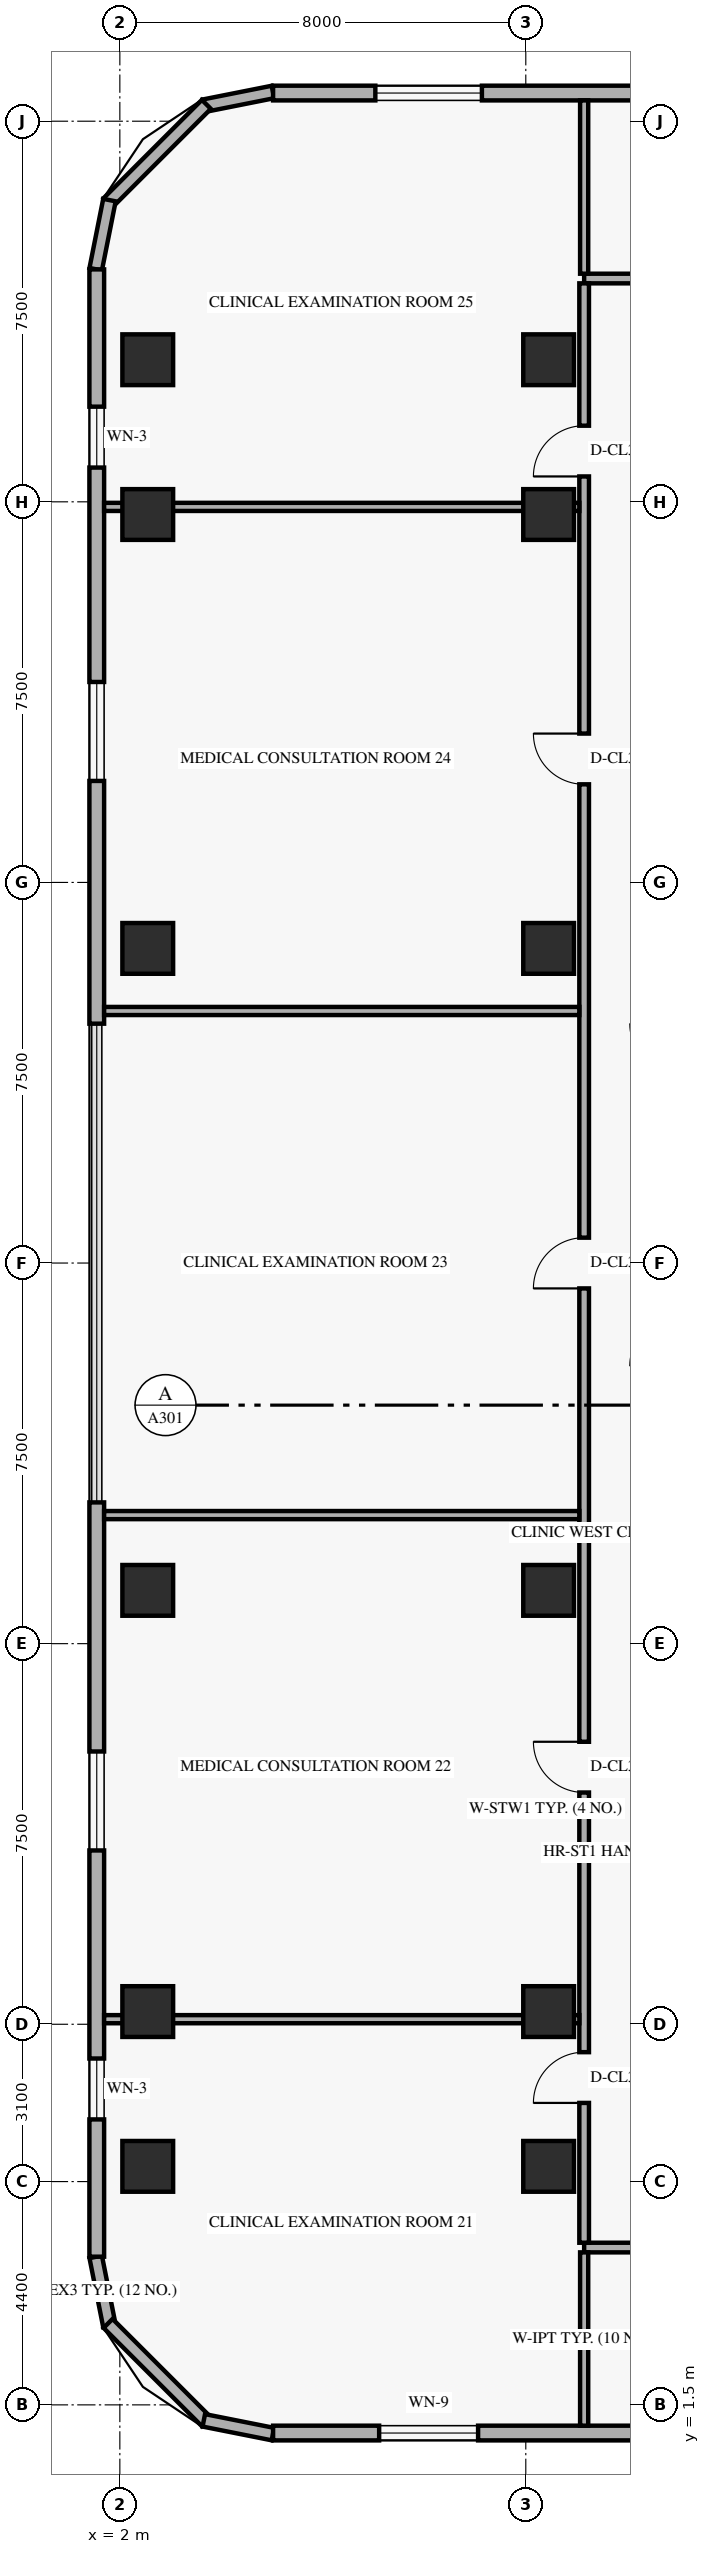
"""IFC4 building model, lengths in metres.
Left out: names, types, materials, properties, quantities, classifications, styles, units other than length and angle.
Written with IfcOpenShell. Run it as: python <this file> out.ifc"""

import sys

from ifc_helpers import new_model, si_unit, direction, frame, frame_2d, origin, origin_2d, place, context, subcontext, project, spatial, rectangle, extrude, element, fill, save


model = new_model("IFC4")
c1 = context("Model", 3, precision=1e-05, world=origin(), true_north=direction((0.0, 1.0)))
c2 = subcontext(c1, "Body", "Model", "MODEL_VIEW")
j1 = project(units=[si_unit("LENGTHUNIT", "METRE"), si_unit("PLANEANGLEUNIT", "RADIAN")], contexts=[c1])
p1 = place(None, origin())
s1 = spatial("IfcSite", under=j1, at=p1, CompositionType="ELEMENT")
p2 = place(p1, origin())
s2 = spatial("IfcBuilding", under=s1, at=p2, CompositionType="ELEMENT")
p3 = place(p2, frame((0.0, 0.0, 9.6)))
s3 = spatial("IfcBuildingStorey", under=s2, at=p3, CompositionType="ELEMENT", Elevation=9.6)
for number, where, z_axis, x_axis in (
    (1, (2.55, 6.2, 0.0), (0.0, 0.0, 1.0), (1.0, 0.0, 0.0)),
    (2, (2.55, 9.25, 0.0), (0.0, 0.0, 1.0), (1.0, 0.0, 0.0)),
    (3, (2.55, 17.55, 0.0), (0.0, 0.0, 1.0), (1.0, 0.0, 0.0)),
    (4, (2.55, 30.2, 0.0), (0.0, 0.0, 1.0), (1.0, 0.0, 0.0)),
    (5, (2.55, 38.75, 0.0), (0.0, 0.0, 1.0), (1.0, 0.0, 0.0)),
    (6, (2.55, 41.8, 0.0), (0.0, 0.0, 1.0), (1.0, 0.0, 0.0)),
    (7, (10.45, 6.2, 0.0), (0.0, 0.0, 1.0), (1.0, 0.0, 0.0)),
    (8, (10.45, 9.25, 0.0), (0.0, 0.0, 1.0), (1.0, 0.0, 0.0)),
    (9, (10.45, 17.55, 0.0), (0.0, 0.0, 1.0), (1.0, 0.0, 0.0)),
    (10, (10.45, 30.2, 0.0), (0.0, 0.0, 1.0), (1.0, 0.0, 0.0)),
    (11, (10.45, 38.75, 0.0), (0.0, 0.0, 1.0), (1.0, 0.0, 0.0)),
    (12, (10.45, 41.8, 0.0), (0.0, 0.0, 1.0), (1.0, 0.0, 0.0)),
):
    element("IfcColumn", number, at=place(p3, frame(where, z_axis=z_axis, x_axis=x_axis)), inside=s3, PredefinedType="COLUMN", context=c2, shape_type="SweptSolid", body=[
        extrude(rectangle(XDim=1.0, YDim=1.0, at=origin_2d()), origin(), (0.0, 0.0, 1.0), 4.8),
    ])
p4 = place(p3, frame((1.524, 4.417, 0.0), z_axis=(0.0, 0.0, 1.0), x_axis=(0.19496651342, -0.980809899341, 0.0)))
e13 = element("IfcWall", 13, at=p4, inside=s3, PredefinedType="SOLIDWALL", context=c2, shape_type="SweptSolid", body=[
    extrude(rectangle(XDim=1.389, YDim=0.25, at=frame_2d((0.694, 0.0))), origin(), (0.0, 0.0, 1.0), 4.52),
])
p5 = place(p3, frame((1.768, 3.105, 0.0), z_axis=(0.0, 0.0, 1.0), x_axis=(0.707106781187, -0.707106781187, 0.0)))
e14 = element("IfcWall", 14, at=p5, inside=s3, PredefinedType="SOLIDWALL", context=c2, shape_type="SweptSolid", body=[
    extrude(rectangle(XDim=2.739, YDim=0.25, at=frame_2d((1.37, 0.0))), origin(), (0.0, 0.0, 1.0), 4.52),
])
for number, where, z_axis, x_axis in (
    (15, (3.655, 1.195, 0.0), (0.0, 0.0, 1.0), (0.981, -0.195, 0.0)),
    (16, (5.017, 47.076, 0.0), (0.0, 0.0, 1.0), (-0.981, -0.195, 0.0)),
):
    element("IfcWall", number, at=place(p3, frame(where, z_axis=z_axis, x_axis=x_axis)), inside=s3, PredefinedType="SOLIDWALL", context=c2, shape_type="SweptSolid", body=[
        extrude(rectangle(XDim=1.389, YDim=0.25, at=frame_2d((0.694, 0.0))), origin(), (0.0, 0.0, 1.0), 4.52),
    ])
p6 = place(p3, frame((3.705, 46.832, 0.0), z_axis=(0.0, 0.0, 1.0), x_axis=(-0.707106781187, -0.707106781187, 0.0)))
e17 = element("IfcWall", 17, at=p6, inside=s3, PredefinedType="SOLIDWALL", context=c2, shape_type="SweptSolid", body=[
    extrude(rectangle(XDim=2.739, YDim=0.25, at=frame_2d((1.37, 0.0))), origin(), (0.0, 0.0, 1.0), 4.52),
])
p7 = place(p3, frame((1.795, 44.946, 0.0), z_axis=(0.0, 0.0, 1.0), x_axis=(-0.19496651342, -0.980809899341, 0.0)))
e18 = element("IfcWall", 18, at=p7, inside=s3, PredefinedType="SOLIDWALL", context=c2, shape_type="SweptSolid", body=[
    extrude(rectangle(XDim=1.389, YDim=0.25, at=frame_2d((0.694, 0.0))), origin(), (0.0, 0.0, 1.0), 4.52),
])
p8 = place(p3, frame((5.02, 0.945, 0.0), z_axis=(0.0, 0.0, 1.0), x_axis=(1.0, 0.0, 0.0)))
e19 = element("IfcWall", 19, at=p8, inside=s3, PredefinedType="SOLIDWALL", context=c2, shape_type="SweptSolid", body=[
    extrude(rectangle(XDim=19.98, YDim=0.29, at=frame_2d((9.99, 0.0))), origin(), (0.0, 0.0, 1.0), 4.52),
])
p9 = place(p8, frame((2.09, 0.0, 0.85)))
e20 = element("IfcOpeningElement", 20, at=p9, cuts=e19, PredefinedType="OPENING", context=c2, shape_type="SweptSolid", body=[
    extrude(rectangle(XDim=1.95, YDim=1.75, at=frame_2d((0.975, 0.875))), frame((0.0, 0.155, 0.0), z_axis=(0.0, -1.0, 0.0), x_axis=(1.0, 0.0, 0.0)), (0.0, 0.0, 1.0), 0.31),
])
p10 = place(p8, frame((12.08, 0.0, 0.85)))
e21 = element("IfcOpeningElement", 21, at=p10, cuts=e19, PredefinedType="OPENING", context=c2, shape_type="SweptSolid", body=[
    extrude(rectangle(XDim=1.95, YDim=1.75, at=frame_2d((0.975, 0.875))), frame((0.0, 0.155, 0.0), z_axis=(0.0, -1.0, 0.0), x_axis=(1.0, 0.0, 0.0)), (0.0, 0.0, 1.0), 0.31),
])
p11 = place(p3, frame((49.38, 47.055, 0.0), z_axis=(0.0, 0.0, 1.0), x_axis=(-1.0, 0.0, 0.0)))
e22 = element("IfcWall", 22, at=p11, inside=s3, PredefinedType="SOLIDWALL", context=c2, shape_type="SweptSolid", body=[
    extrude(rectangle(XDim=44.36, YDim=0.29, at=frame_2d((22.18, 0.0))), origin(), (0.0, 0.0, 1.0), 4.52),
])
p12 = place(p11, frame((40.245, 0.0, 0.85)))
e23 = element("IfcOpeningElement", 23, at=p12, cuts=e22, PredefinedType="OPENING", context=c2, shape_type="SweptSolid", body=[
    extrude(rectangle(XDim=2.1, YDim=1.75, at=frame_2d((1.05, 0.875))), frame((0.0, 0.155, 0.0), z_axis=(0.0, -1.0, 0.0), x_axis=(1.0, 0.0, 0.0)), (0.0, 0.0, 1.0), 0.31),
])
p13 = place(p11, frame((23.98, 0.0, 0.85)))
e24 = element("IfcOpeningElement", 24, at=p13, cuts=e22, PredefinedType="OPENING", context=c2, shape_type="SweptSolid", body=[
    extrude(rectangle(XDim=2.1, YDim=1.75, at=frame_2d((1.05, 0.875))), frame((0.0, 0.155, 0.0), z_axis=(0.0, -1.0, 0.0), x_axis=(1.0, 0.0, 0.0)), (0.0, 0.0, 1.0), 0.31),
])
p14 = place(p11, frame((4.865, 0.0, 0.85)))
e25 = element("IfcOpeningElement", 25, at=p14, cuts=e22, PredefinedType="OPENING", context=c2, shape_type="SweptSolid", body=[
    extrude(rectangle(XDim=2.1, YDim=1.75, at=frame_2d((1.05, 0.875))), frame((0.0, 0.155, 0.0), z_axis=(0.0, -1.0, 0.0), x_axis=(1.0, 0.0, 0.0)), (0.0, 0.0, 1.0), 0.31),
])
p15 = place(p3, frame((1.545, 43.58, 0.0), z_axis=(0.0, 0.0, 1.0), x_axis=(0.0, -1.0, 0.0)))
e26 = element("IfcWall", 26, at=p15, inside=s3, PredefinedType="SOLIDWALL", context=c2, shape_type="SweptSolid", body=[
    extrude(rectangle(XDim=14.863, YDim=0.29, at=frame_2d((7.432, 0.0))), origin(), (0.0, 0.0, 1.0), 4.52),
])
p16 = place(p15, frame((8.13, 0.0, 0.85)))
e27 = element("IfcOpeningElement", 27, at=p16, cuts=e26, PredefinedType="OPENING", context=c2, shape_type="SweptSolid", body=[
    extrude(rectangle(XDim=1.95, YDim=1.75, at=frame_2d((0.975, 0.875))), frame((0.0, 0.155, 0.0), z_axis=(0.0, -1.0, 0.0), x_axis=(1.0, 0.0, 0.0)), (0.0, 0.0, 1.0), 0.31),
])
p17 = place(p15, frame((2.705, 0.0, 0.85)))
e28 = element("IfcOpeningElement", 28, at=p17, cuts=e26, PredefinedType="OPENING", context=c2, shape_type="SweptSolid", body=[
    extrude(rectangle(XDim=1.2, YDim=1.5, at=frame_2d((0.6, 0.75))), frame((0.0, 0.155, 0.0), z_axis=(0.0, -1.0, 0.0), x_axis=(1.0, 0.0, 0.0)), (0.0, 0.0, 1.0), 0.31),
])
p18 = place(p3, frame((1.545, 19.283, 0.0), z_axis=(0.0, 0.0, 1.0), x_axis=(0.0, -1.0, 0.0)))
e29 = element("IfcWall", 29, at=p18, inside=s3, PredefinedType="SOLIDWALL", context=c2, shape_type="SweptSolid", body=[
    extrude(rectangle(XDim=14.863, YDim=0.29, at=frame_2d((7.432, 0.0))), origin(), (0.0, 0.0, 1.0), 4.52),
])
p19 = place(p18, frame((10.958, 0.0, 0.85)))
e30 = element("IfcOpeningElement", 30, at=p19, cuts=e29, PredefinedType="OPENING", context=c2, shape_type="SweptSolid", body=[
    extrude(rectangle(XDim=1.2, YDim=1.5, at=frame_2d((0.6, 0.75))), frame((0.0, 0.155, 0.0), z_axis=(0.0, -1.0, 0.0), x_axis=(1.0, 0.0, 0.0)), (0.0, 0.0, 1.0), 0.31),
])
p20 = place(p18, frame((4.908, 0.0, 0.85)))
e31 = element("IfcOpeningElement", 31, at=p20, cuts=e29, PredefinedType="OPENING", context=c2, shape_type="SweptSolid", body=[
    extrude(rectangle(XDim=1.95, YDim=1.75, at=frame_2d((0.975, 0.875))), frame((0.0, 0.155, 0.0), z_axis=(0.0, -1.0, 0.0), x_axis=(1.0, 0.0, 0.0)), (0.0, 0.0, 1.0), 0.31),
])
for number, where, z_axis, x_axis in (
    (32, (11.15, 4.6, 0.0), (0.0, 0.0, 1.0), (1.0, 0.0, 0.0)),
    (33, (11.15, 43.4, 0.0), (0.0, 0.0, 1.0), (1.0, 0.0, 0.0)),
):
    element("IfcWall", number, at=place(p3, frame(where, z_axis=z_axis, x_axis=x_axis)), inside=s3, PredefinedType="STANDARD", context=c2, shape_type="SweptSolid", body=[
        extrude(rectangle(XDim=1.85, YDim=0.19, at=frame_2d((0.925, 0.0))), origin(), (0.0, 0.0, 1.0), 4.52),
    ])
p21 = place(p3, frame((11.15, 4.695, 0.0), z_axis=(0.0, 0.0, 1.0), x_axis=(0.0, 1.0, 0.0)))
e34 = element("IfcWall", 34, at=p21, inside=s3, PredefinedType="STANDARD", context=c2, shape_type="SweptSolid", body=[
    extrude(rectangle(XDim=38.61, YDim=0.19, at=frame_2d((19.305, 0.0))), origin(), (0.0, 0.0, 1.0), 3.575),
])
p22 = place(p21, frame((2.755, 0.0, 0.0)))
e35 = element("IfcOpeningElement", 35, at=p22, cuts=e34, PredefinedType="OPENING", context=c2, shape_type="SweptSolid", body=[
    extrude(rectangle(XDim=1.0, YDim=2.15, at=frame_2d((0.5, 1.075))), frame((0.0, 0.105, 0.0), z_axis=(0.0, -1.0, 0.0), x_axis=(1.0, 0.0, 0.0)), (0.0, 0.0, 1.0), 0.21),
])
p23 = place(p21, frame((8.872, 0.0, 0.0)))
e36 = element("IfcOpeningElement", 36, at=p23, cuts=e34, PredefinedType="OPENING", context=c2, shape_type="SweptSolid", body=[
    extrude(rectangle(XDim=1.0, YDim=2.15, at=frame_2d((0.5, 1.075))), frame((0.0, 0.105, 0.0), z_axis=(0.0, -1.0, 0.0), x_axis=(1.0, 0.0, 0.0)), (0.0, 0.0, 1.0), 0.21),
])
p24 = place(p21, frame((18.805, 0.0, 0.0)))
e37 = element("IfcOpeningElement", 37, at=p24, cuts=e34, PredefinedType="OPENING", context=c2, shape_type="SweptSolid", body=[
    extrude(rectangle(XDim=1.0, YDim=2.15, at=frame_2d((0.5, 1.075))), frame((0.0, 0.105, 0.0), z_axis=(0.0, -1.0, 0.0), x_axis=(1.0, 0.0, 0.0)), (0.0, 0.0, 1.0), 0.21),
])
p25 = place(p21, frame((28.738, 0.0, 0.0)))
e38 = element("IfcOpeningElement", 38, at=p25, cuts=e34, PredefinedType="OPENING", context=c2, shape_type="SweptSolid", body=[
    extrude(rectangle(XDim=1.0, YDim=2.15, at=frame_2d((0.5, 1.075))), frame((0.0, 0.105, 0.0), z_axis=(0.0, -1.0, 0.0), x_axis=(1.0, 0.0, 0.0)), (0.0, 0.0, 1.0), 0.21),
])
p26 = place(p21, frame((34.805, 0.0, 0.0)))
e39 = element("IfcOpeningElement", 39, at=p26, cuts=e34, PredefinedType="OPENING", context=c2, shape_type="SweptSolid", body=[
    extrude(rectangle(XDim=1.0, YDim=2.15, at=frame_2d((0.5, 1.075))), frame((0.0, 0.105, 0.0), z_axis=(0.0, -1.0, 0.0), x_axis=(1.0, 0.0, 0.0)), (0.0, 0.0, 1.0), 0.21),
])
for number, where, z_axis, x_axis in (
    (40, (11.15, 1.09, 0.0), (0.0, 0.0, 1.0), (0.0, 1.0, 0.0)),
    (41, (11.15, 43.495, 0.0), (0.0, 0.0, 1.0), (0.0, 1.0, 0.0)),
):
    element("IfcWall", number, at=place(p3, frame(where, z_axis=z_axis, x_axis=x_axis)), inside=s3, PredefinedType="PARTITIONING", context=c2, shape_type="SweptSolid", body=[
        extrude(rectangle(XDim=3.415, YDim=0.16, at=frame_2d((1.708, 0.0))), origin(), (0.0, 0.0, 1.0), 4.52),
    ])
p27 = place(p3, frame((1.69, 9.1, 0.0), z_axis=(0.0, 0.0, 1.0), x_axis=(1.0, 0.0, 0.0)))
e42 = element("IfcWall", 42, at=p27, inside=s3, PredefinedType="PARTITIONING", context=c2, shape_type="SweptSolid", body=[
    extrude(rectangle(XDim=9.365, YDim=0.16, at=frame_2d((4.683, 0.0))), origin(), (0.0, 0.0, 1.0), 3.575),
])
for number, where, z_axis, x_axis in (
    (43, (1.69, 19.033, 0.0), (0.0, 0.0, 1.0), (1.0, 0.0, 0.0)),
    (44, (1.69, 28.967, 0.0), (0.0, 0.0, 1.0), (1.0, 0.0, 0.0)),
):
    element("IfcWall", number, at=place(p3, frame(where, z_axis=z_axis, x_axis=x_axis)), inside=s3, PredefinedType="PARTITIONING", context=c2, shape_type="SweptSolid", body=[
        extrude(rectangle(XDim=9.365, YDim=0.16, at=frame_2d((4.683, 0.0))), origin(), (0.0, 0.0, 1.0), 3.732),
    ])
p28 = place(p3, frame((1.69, 38.9, 0.0), z_axis=(0.0, 0.0, 1.0), x_axis=(1.0, 0.0, 0.0)))
e45 = element("IfcWall", 45, at=p28, inside=s3, PredefinedType="PARTITIONING", context=c2, shape_type="SweptSolid", body=[
    extrude(rectangle(XDim=9.365, YDim=0.16, at=frame_2d((4.683, 0.0))), origin(), (0.0, 0.0, 1.0), 3.575),
])
p29 = place(p9, origin())
e46 = element("IfcWindow", 46, at=p29, inside=s3, PartitioningType="SINGLE_PANEL", PredefinedType="WINDOW", context=c2, shape_type="SweptSolid", body=[
    extrude(rectangle(XDim=1.95, YDim=1.75, at=frame_2d((0.975, 0.875))), frame((0.0, 0.03, 0.0), z_axis=(0.0, -1.0, 0.0), x_axis=(1.0, 0.0, 0.0)), (0.0, 0.0, 1.0), 0.06),
])
fill(e20, e46)
p30 = place(p12, origin())
e47 = element("IfcWindow", 47, at=p30, inside=s3, PartitioningType="SINGLE_PANEL", PredefinedType="WINDOW", context=c2, shape_type="SweptSolid", body=[
    extrude(rectangle(XDim=2.1, YDim=1.75, at=frame_2d((1.05, 0.875))), frame((0.0, 0.03, 0.0), z_axis=(0.0, -1.0, 0.0), x_axis=(1.0, 0.0, 0.0)), (0.0, 0.0, 1.0), 0.06),
])
fill(e23, e47)
p31 = place(p16, origin())
e48 = element("IfcWindow", 48, at=p31, inside=s3, PartitioningType="SINGLE_PANEL", PredefinedType="WINDOW", context=c2, shape_type="SweptSolid", body=[
    extrude(rectangle(XDim=1.95, YDim=1.75, at=frame_2d((0.975, 0.875))), frame((0.0, 0.03, 0.0), z_axis=(0.0, -1.0, 0.0), x_axis=(1.0, 0.0, 0.0)), (0.0, 0.0, 1.0), 0.06),
])
fill(e27, e48)
p32 = place(p17, origin())
e49 = element("IfcWindow", 49, at=p32, inside=s3, PartitioningType="SINGLE_PANEL", PredefinedType="WINDOW", context=c2, shape_type="SweptSolid", body=[
    extrude(rectangle(XDim=1.2, YDim=1.5, at=frame_2d((0.6, 0.75))), frame((0.0, 0.03, 0.0), z_axis=(0.0, -1.0, 0.0), x_axis=(1.0, 0.0, 0.0)), (0.0, 0.0, 1.0), 0.06),
])
fill(e28, e49)
p33 = place(p19, origin())
e50 = element("IfcWindow", 50, at=p33, inside=s3, PartitioningType="SINGLE_PANEL", PredefinedType="WINDOW", context=c2, shape_type="SweptSolid", body=[
    extrude(rectangle(XDim=1.2, YDim=1.5, at=frame_2d((0.6, 0.75))), frame((0.0, 0.03, 0.0), z_axis=(0.0, -1.0, 0.0), x_axis=(1.0, 0.0, 0.0)), (0.0, 0.0, 1.0), 0.06),
])
fill(e30, e50)
p34 = place(p20, origin())
e51 = element("IfcWindow", 51, at=p34, inside=s3, PartitioningType="SINGLE_PANEL", PredefinedType="WINDOW", context=c2, shape_type="SweptSolid", body=[
    extrude(rectangle(XDim=1.95, YDim=1.75, at=frame_2d((0.975, 0.875))), frame((0.0, 0.03, 0.0), z_axis=(0.0, -1.0, 0.0), x_axis=(1.0, 0.0, 0.0)), (0.0, 0.0, 1.0), 0.06),
])
fill(e31, e51)
p35 = place(p22, origin())
e52 = element("IfcDoor", 52, at=p35, inside=s3, OperationType="SINGLE_SWING_LEFT", PredefinedType="DOOR", context=c2, shape_type="SweptSolid", body=[
    extrude(rectangle(XDim=1.0, YDim=2.15, at=frame_2d((0.5, 1.075))), frame((0.0, 0.025, 0.0), z_axis=(0.0, -1.0, 0.0), x_axis=(1.0, 0.0, 0.0)), (0.0, 0.0, 1.0), 0.05),
])
fill(e35, e52)
p36 = place(p23, origin())
e53 = element("IfcDoor", 53, at=p36, inside=s3, OperationType="SINGLE_SWING_RIGHT", PredefinedType="DOOR", context=c2, shape_type="SweptSolid", body=[
    extrude(rectangle(XDim=1.0, YDim=2.15, at=frame_2d((0.5, 1.075))), frame((0.0, 0.025, 0.0), z_axis=(0.0, -1.0, 0.0), x_axis=(1.0, 0.0, 0.0)), (0.0, 0.0, 1.0), 0.05),
])
fill(e36, e53)
p37 = place(p24, origin())
e54 = element("IfcDoor", 54, at=p37, inside=s3, OperationType="SINGLE_SWING_LEFT", PredefinedType="DOOR", context=c2, shape_type="SweptSolid", body=[
    extrude(rectangle(XDim=1.0, YDim=2.15, at=frame_2d((0.5, 1.075))), frame((0.0, 0.025, 0.0), z_axis=(0.0, -1.0, 0.0), x_axis=(1.0, 0.0, 0.0)), (0.0, 0.0, 1.0), 0.05),
])
fill(e37, e54)
p38 = place(p25, origin())
e55 = element("IfcDoor", 55, at=p38, inside=s3, OperationType="SINGLE_SWING_RIGHT", PredefinedType="DOOR", context=c2, shape_type="SweptSolid", body=[
    extrude(rectangle(XDim=1.0, YDim=2.15, at=frame_2d((0.5, 1.075))), frame((0.0, 0.025, 0.0), z_axis=(0.0, -1.0, 0.0), x_axis=(1.0, 0.0, 0.0)), (0.0, 0.0, 1.0), 0.05),
])
fill(e38, e55)
p39 = place(p26, origin())
e56 = element("IfcDoor", 56, at=p39, inside=s3, OperationType="SINGLE_SWING_LEFT", PredefinedType="DOOR", context=c2, shape_type="SweptSolid", body=[
    extrude(rectangle(XDim=1.0, YDim=2.15, at=frame_2d((0.5, 1.075))), frame((0.0, 0.025, 0.0), z_axis=(0.0, -1.0, 0.0), x_axis=(1.0, 0.0, 0.0)), (0.0, 0.0, 1.0), 0.05),
])
fill(e39, e56)
save(model, sys.argv[1])
